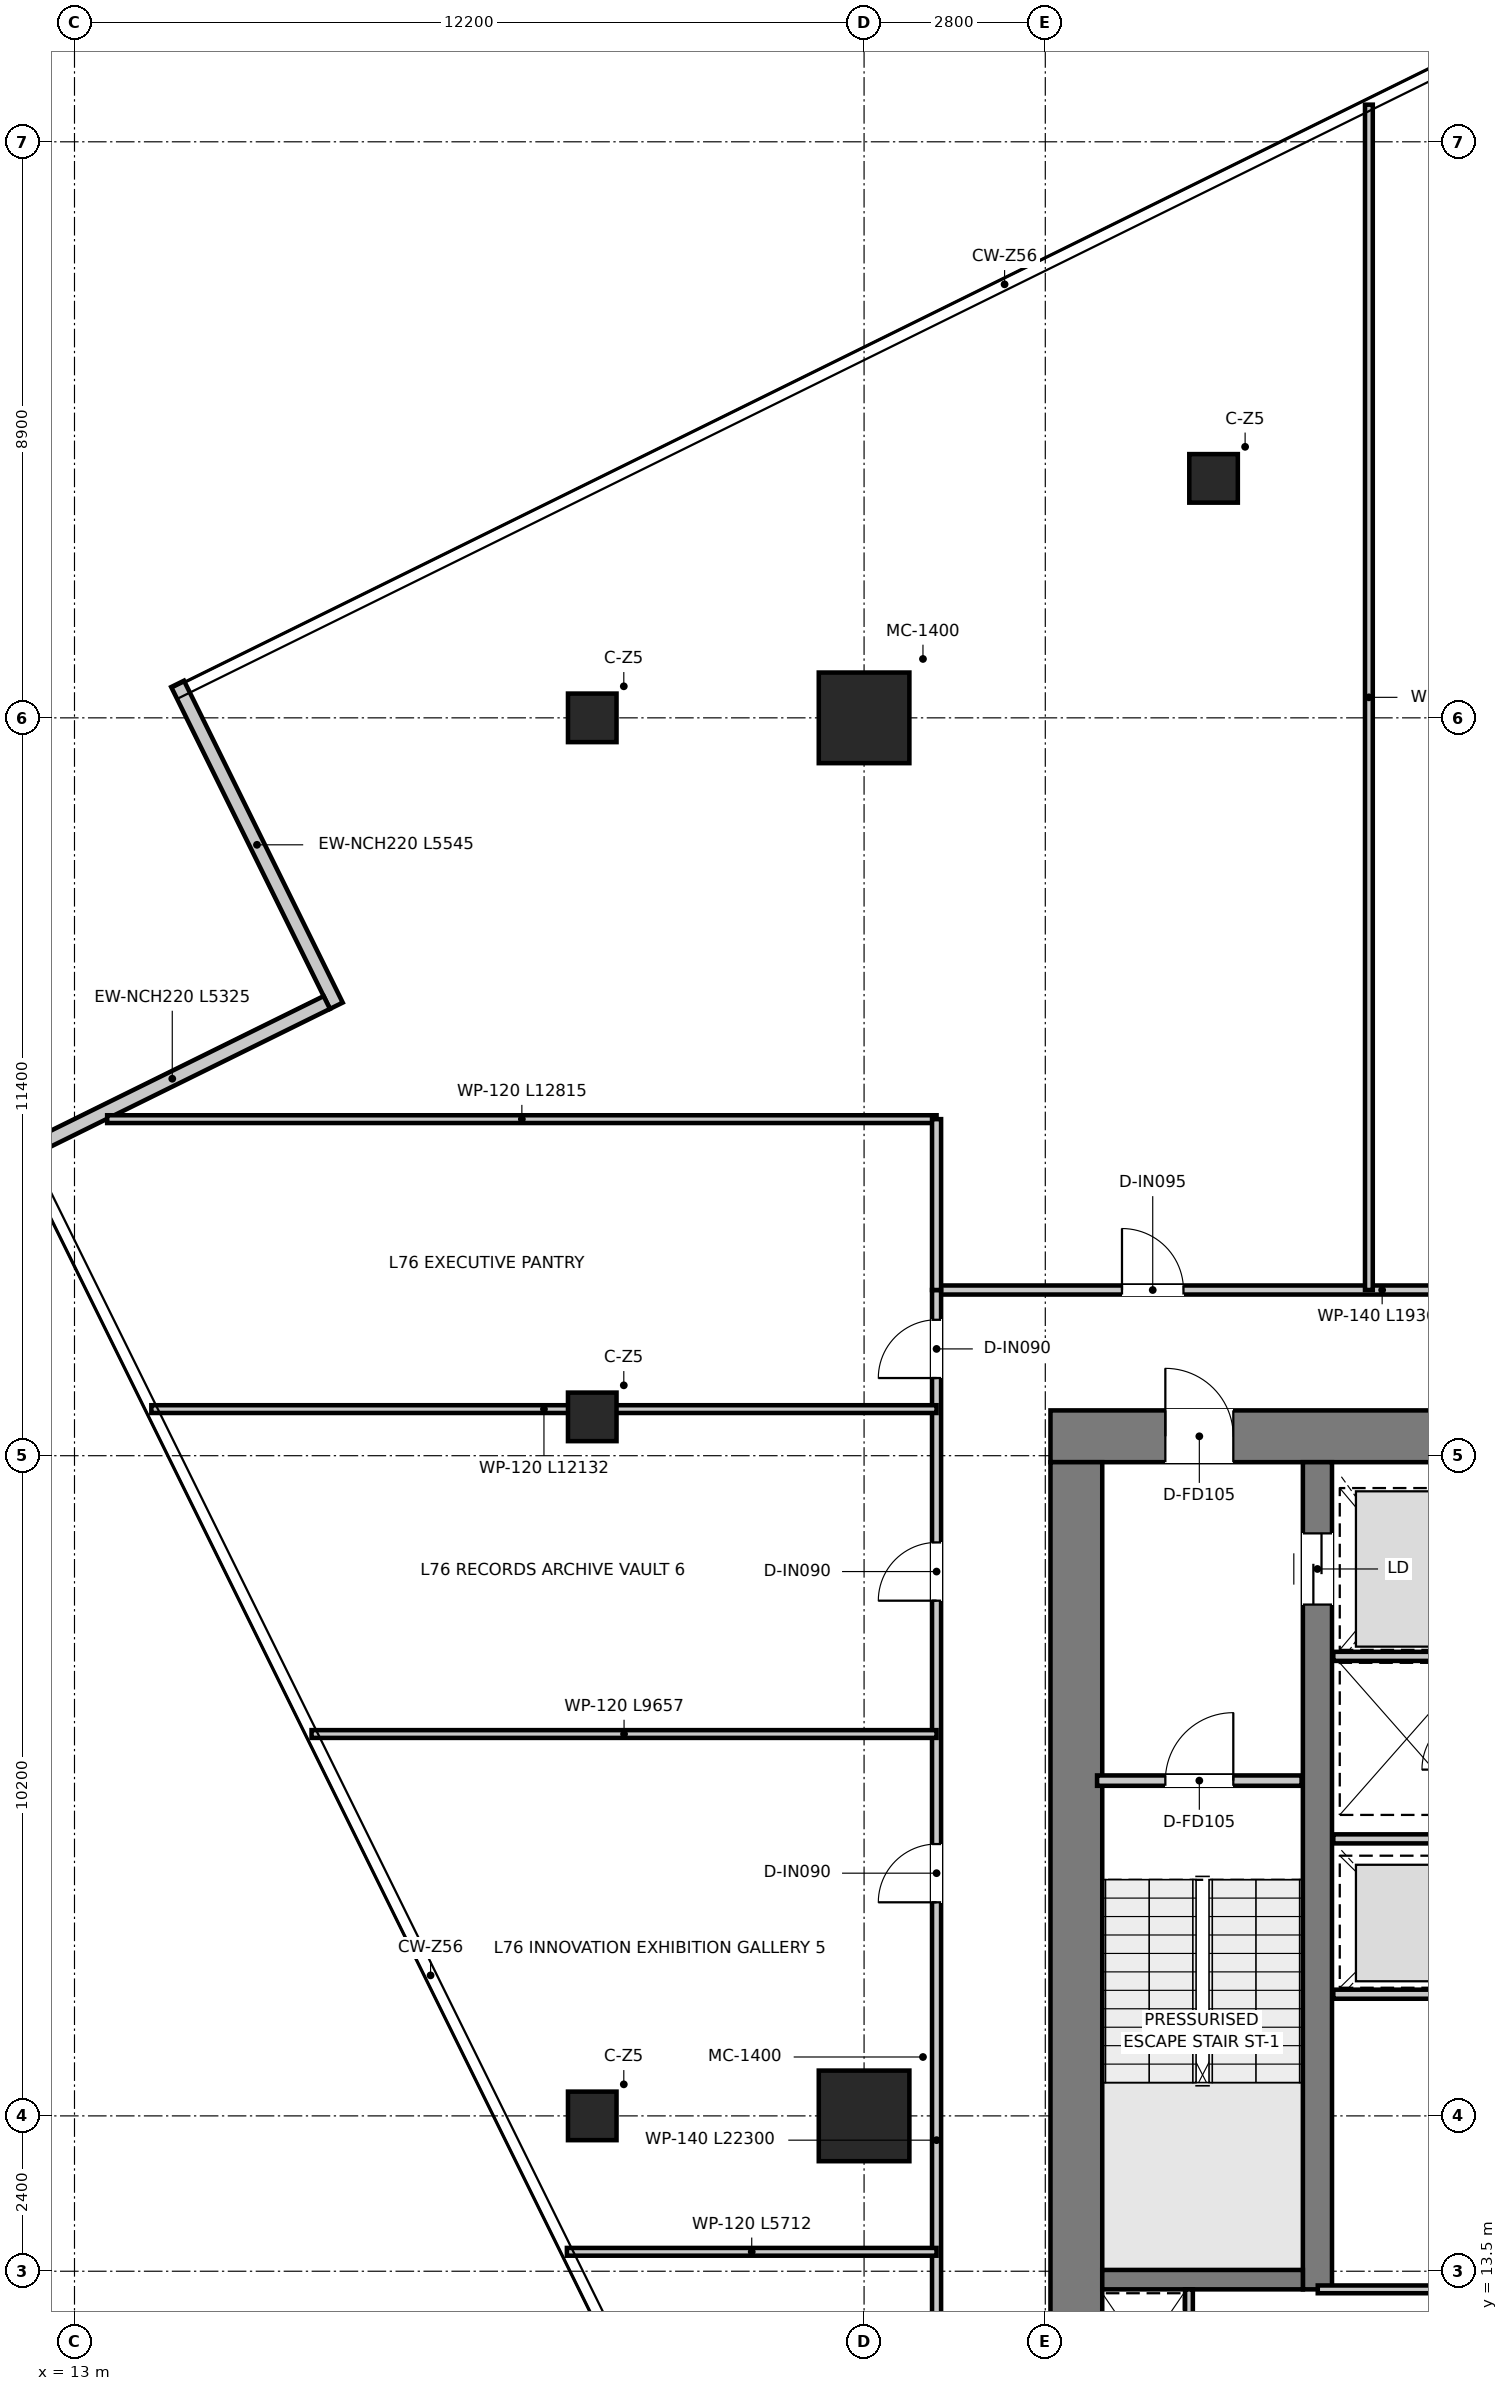
"""IFC4 building model, lengths in metres.
Left out: names, types, materials, properties, quantities, classifications, styles, units other than length and angle.
Written with IfcOpenShell. Run it as: python <this file> out.ifc"""

import sys

from ifc_helpers import new_model, si_unit, direction, frame, frame_2d, origin, origin_2d, place, context, subcontext, project, spatial, rectangle, extrude, source, transform, mapped, element, fill, save


model = new_model("IFC4")
c1 = context("Model", 3, precision=1e-05, world=origin(), true_north=direction((0.0, 1.0)))
c2 = subcontext(c1, "Body", "Model", "MODEL_VIEW")
j1 = project(units=[si_unit("LENGTHUNIT", "METRE"), si_unit("PLANEANGLEUNIT", "RADIAN")], contexts=[c1])
p1 = place(None, origin())
s1 = spatial("IfcSite", under=j1, at=p1, CompositionType="ELEMENT")
p2 = place(p1, origin())
s2 = spatial("IfcBuilding", under=s1, at=p2, CompositionType="ELEMENT")
p3 = place(p2, frame((0.0, 0.0, 310.85)))
s3 = spatial("IfcBuildingStorey", under=s2, at=p3, CompositionType="ELEMENT", Elevation=310.85)
p4 = place(p3, frame((28.08, 26.4, 0.0), z_axis=(0.0, 0.0, 1.0), x_axis=(1.0, 0.0, 0.0)))
e1 = element("IfcWall", 1, at=p4, inside=s3, PredefinedType="SHEAR", context=c2, shape_type="SweptSolid", body=[
    extrude(rectangle(XDim=15.84, YDim=0.8, at=frame_2d((7.92, 0.0))), origin(), (0.0, 0.0, 1.0), 3.95),
])
p5 = place(p4, frame((7.22, 0.0, 0.0)))
e2 = element("IfcOpeningElement", 2, at=p5, cuts=e1, PredefinedType="OPENING", context=c2, shape_type="SweptSolid", body=[
    extrude(rectangle(XDim=1.4, YDim=2.2, at=frame_2d((0.7, 1.1))), frame((0.0, 0.41, 0.0), z_axis=(0.0, -1.0, 0.0), x_axis=(1.0, 0.0, 0.0)), (0.0, 0.0, 1.0), 0.82),
])
p6 = place(p4, frame((1.775, 0.0, 0.0)))
e3 = element("IfcOpeningElement", 3, at=p6, cuts=e1, PredefinedType="OPENING", context=c2, shape_type="SweptSolid", body=[
    extrude(rectangle(XDim=1.05, YDim=2.1, at=frame_2d((0.525, 1.05))), frame((0.0, 0.41, 0.0), z_axis=(0.0, -1.0, 0.0), x_axis=(1.0, 0.0, 0.0)), (0.0, 0.0, 1.0), 0.82),
])
p7 = place(p4, frame((13.015, 0.0, 0.0)))
e4 = element("IfcOpeningElement", 4, at=p7, cuts=e1, PredefinedType="OPENING", context=c2, shape_type="SweptSolid", body=[
    extrude(rectangle(XDim=1.05, YDim=2.1, at=frame_2d((0.525, 1.05))), frame((0.0, 0.41, 0.0), z_axis=(0.0, -1.0, 0.0), x_axis=(1.0, 0.0, 0.0)), (0.0, 0.0, 1.0), 0.82),
])
p8 = place(p3, frame((28.48, 11.3, 0.0), z_axis=(0.0, 0.0, 1.0), x_axis=(0.0, 1.0, 0.0)))
e5 = element("IfcWall", 5, at=p8, inside=s3, PredefinedType="SHEAR", context=c2, shape_type="SweptSolid", body=[
    extrude(rectangle(XDim=14.7, YDim=0.8, at=frame_2d((7.35, 0.0))), origin(), (0.0, 0.0, 1.0), 3.95),
])
p9 = place(p3, frame((32.205, 13.22, 0.0), z_axis=(0.0, 0.0, 1.0), x_axis=(0.0, 1.0, 0.0)))
e6 = element("IfcWall", 6, at=p9, inside=s3, PredefinedType="SHEAR", context=c2, shape_type="SweptSolid", body=[
    extrude(rectangle(XDim=12.78, YDim=0.45, at=frame_2d((6.39, 0.0))), origin(), (0.0, 0.0, 1.0), 3.95),
])
p10 = place(p9, frame((10.58, 0.0, 0.0)))
e7 = element("IfcOpeningElement", 7, at=p10, cuts=e6, PredefinedType="OPENING", context=c2, shape_type="SweptSolid", body=[
    extrude(rectangle(XDim=1.1, YDim=2.15, at=frame_2d((0.55, 1.075))), frame((0.0, 0.235, 0.0), z_axis=(0.0, -1.0, 0.0), x_axis=(1.0, 0.0, 0.0)), (0.0, 0.0, 1.0), 0.47),
])
p11 = place(p3, frame((28.88, 13.37, 0.0), z_axis=(0.0, 0.0, 1.0), x_axis=(1.0, 0.0, 0.0)))
e8 = element("IfcWall", 8, at=p11, inside=s3, PredefinedType="SHEAR", context=c2, shape_type="SweptSolid", body=[
    extrude(rectangle(XDim=3.1, YDim=0.3, at=frame_2d((1.55, 0.0))), origin(), (0.0, 0.0, 1.0), 3.95),
])
m1 = source(origin(), c2, "Body", "SweptSolid", [
    extrude(rectangle(XDim=1.4, YDim=1.4, at=origin_2d()), origin(), (0.0, 0.0, 1.0), 3.95),
])
for number, where, z_axis, x_axis in (
    (9, (25.2, 15.9, 0.0), (0.0, 0.0, 1.0), (1.0, 0.0, 0.0)),
    (10, (25.2, 37.5, 0.0), (0.0, 0.0, 1.0), (1.0, 0.0, 0.0)),
):
    element("IfcColumn", number, at=place(p3, frame(where, z_axis=z_axis, x_axis=x_axis)), inside=s3, PredefinedType="USERDEFINED", context=c2, shape_type="MappedRepresentation", body=[
        mapped(m1, transform((0.0, 0.0, 0.0), x_axis=(1.0, 0.0, 0.0), y_axis=(0.0, 1.0, 0.0), z_axis=(0.0, 0.0, 1.0), scale=1.0)),
    ])
m2 = source(origin(), c2, "Body", "SweptSolid", [
    extrude(rectangle(XDim=0.75, YDim=0.75, at=origin_2d()), origin(), (0.0, 0.0, 1.0), 3.95),
])
for number, where, z_axis, x_axis in (
    (11, (21.0, 15.9, 0.0), (0.0, 0.0, 1.0), (1.0, 0.0, 0.0)),
    (12, (21.0, 26.7, 0.0), (0.0, 0.0, 1.0), (1.0, 0.0, 0.0)),
    (13, (21.0, 37.5, 0.0), (0.0, 0.0, 1.0), (1.0, 0.0, 0.0)),
    (14, (30.6, 41.2, 0.0), (0.0, 0.0, 1.0), (1.0, 0.0, 0.0)),
):
    element("IfcColumn", number, at=place(p3, frame(where, z_axis=z_axis, x_axis=x_axis)), inside=s3, PredefinedType="COLUMN", context=c2, shape_type="MappedRepresentation", body=[
        mapped(m2, transform((0.0, 0.0, 0.0), x_axis=(1.0, 0.0, 0.0), y_axis=(0.0, 1.0, 0.0), z_axis=(0.0, 0.0, 1.0), scale=1.0)),
    ])
p12 = place(p3, frame((14.594, 38.025, 0.0), z_axis=(0.0, 0.0, 1.0), x_axis=(0.442275503639, -0.896879244314, 0.0)))
e15 = element("IfcWall", 15, at=p12, inside=s3, PredefinedType="ELEMENTEDWALL", context=c2, shape_type="SweptSolid", body=[
    extrude(rectangle(XDim=5.545, YDim=0.22, at=frame_2d((2.772, 0.0))), origin(), (0.0, 0.0, 1.0), 3.67),
])
p13 = place(p3, frame((16.899, 33.102, 0.0), z_axis=(0.0, 0.0, 1.0), x_axis=(-0.896889306105, -0.442255099003, 0.0)))
e16 = element("IfcWall", 16, at=p13, inside=s3, PredefinedType="ELEMENTEDWALL", context=c2, shape_type="SweptSolid", body=[
    extrude(rectangle(XDim=5.325, YDim=0.22, at=frame_2d((2.663, 0.0))), origin(), (0.0, 0.0, 1.0), 3.67),
])
p14 = place(p3, frame((28.8, 21.08, 0.0), z_axis=(0.0, 0.0, 1.0), x_axis=(1.0, 0.0, 0.0)))
e17 = element("IfcWall", 17, at=p14, inside=s3, PredefinedType="PARTITIONING", context=c2, shape_type="SweptSolid", body=[
    extrude(rectangle(XDim=3.16, YDim=0.16, at=frame_2d((1.58, 0.0))), origin(), (0.0, 0.0, 1.0), 3.67),
])
p15 = place(p14, frame((1.055, 0.0, 0.0)))
e18 = element("IfcOpeningElement", 18, at=p15, cuts=e17, PredefinedType="OPENING", context=c2, shape_type="SweptSolid", body=[
    extrude(rectangle(XDim=1.05, YDim=2.1, at=frame_2d((0.525, 1.05))), frame((0.0, 0.09, 0.0), z_axis=(0.0, -1.0, 0.0), x_axis=(1.0, 0.0, 0.0)), (0.0, 0.0, 1.0), 0.18),
])
p16 = place(p3, frame((32.45, 23.0, 0.0), z_axis=(0.0, 0.0, 1.0), x_axis=(1.0, 0.0, 0.0)))
e19 = element("IfcWall", 19, at=p16, inside=s3, PredefinedType="PARTITIONING", context=c2, shape_type="SweptSolid", body=[
    extrude(rectangle(XDim=2.27, YDim=0.14, at=frame_2d((1.135, 0.0))), origin(), (0.0, 0.0, 1.0), 2.82),
])
for number, where, z_axis, x_axis in (
    (20, (32.45, 17.78, 0.0), (0.0, 0.0, 1.0), (1.0, 0.0, 0.0)),
    (21, (32.45, 20.18, 0.0), (0.0, 0.0, 1.0), (1.0, 0.0, 0.0)),
):
    element("IfcWall", number, at=place(p3, frame(where, z_axis=z_axis, x_axis=x_axis)), inside=s3, PredefinedType="PARTITIONING", context=c2, shape_type="SweptSolid", body=[
        extrude(rectangle(XDim=2.27, YDim=0.14, at=frame_2d((1.135, 0.0))), origin(), (0.0, 0.0, 1.0), 3.67),
    ])
p17 = place(p3, frame((30.22, 11.25, 0.0), z_axis=(0.0, 0.0, 1.0), x_axis=(0.0, 1.0, 0.0)))
e22 = element("IfcWall", 22, at=p17, inside=s3, PredefinedType="PARTITIONING", context=c2, shape_type="SweptSolid", body=[
    extrude(rectangle(XDim=1.97, YDim=0.12, at=frame_2d((0.985, 0.0))), origin(), (0.0, 0.0, 1.0), 3.67),
])
p18 = place(p3, frame((32.21, 13.22, 0.0), z_axis=(0.0, 0.0, 1.0), x_axis=(1.0, 0.0, 0.0)))
e23 = element("IfcWall", 23, at=p18, inside=s3, PredefinedType="PARTITIONING", context=c2, shape_type="SweptSolid", body=[
    extrude(rectangle(XDim=7.58, YDim=0.12, at=frame_2d((3.79, 0.0))), origin(), (0.0, 0.0, 1.0), 3.67),
])
p19 = place(p18, frame((3.365, 0.0, 0.0)))
e24 = element("IfcOpeningElement", 24, at=p19, cuts=e23, PredefinedType="OPENING", context=c2, shape_type="SweptSolid", body=[
    extrude(rectangle(XDim=0.85, YDim=2.1, at=frame_2d((0.425, 1.05))), frame((0.0, 0.07, 0.0), z_axis=(0.0, -1.0, 0.0), x_axis=(1.0, 0.0, 0.0)), (0.0, 0.0, 1.0), 0.14),
])
p20 = place(p3, frame((26.32, 28.66, 0.0), z_axis=(0.0, 0.0, 1.0), x_axis=(1.0, 0.0, 0.0)))
e25 = element("IfcWall", 25, at=p20, inside=s3, PredefinedType="PARTITIONING", context=c2, shape_type="SweptSolid", body=[
    extrude(rectangle(XDim=19.36, YDim=0.14, at=frame_2d((9.68, 0.0))), origin(), (0.0, 0.0, 1.0), 3.18),
])
p21 = place(p20, frame((2.865, 0.0, 0.0)))
e26 = element("IfcOpeningElement", 26, at=p21, cuts=e25, PredefinedType="OPENING", context=c2, shape_type="SweptSolid", body=[
    extrude(rectangle(XDim=0.95, YDim=2.1, at=frame_2d((0.475, 1.05))), frame((0.0, 0.08, 0.0), z_axis=(0.0, -1.0, 0.0), x_axis=(1.0, 0.0, 0.0)), (0.0, 0.0, 1.0), 0.16),
])
p22 = place(p20, frame((9.955, 0.0, 0.0)))
e27 = element("IfcOpeningElement", 27, at=p22, cuts=e25, PredefinedType="OPENING", context=c2, shape_type="SweptSolid", body=[
    extrude(rectangle(XDim=0.95, YDim=2.1, at=frame_2d((0.475, 1.05))), frame((0.0, 0.08, 0.0), z_axis=(0.0, -1.0, 0.0), x_axis=(1.0, 0.0, 0.0)), (0.0, 0.0, 1.0), 0.16),
])
p23 = place(p20, frame((16.295, 0.0, 0.0)))
e28 = element("IfcOpeningElement", 28, at=p23, cuts=e25, PredefinedType="OPENING", context=c2, shape_type="SweptSolid", body=[
    extrude(rectangle(XDim=0.95, YDim=2.1, at=frame_2d((0.475, 1.05))), frame((0.0, 0.08, 0.0), z_axis=(0.0, -1.0, 0.0), x_axis=(1.0, 0.0, 0.0)), (0.0, 0.0, 1.0), 0.16),
])
p24 = place(p3, frame((26.32, 9.0, 0.0), z_axis=(0.0, 0.0, 1.0), x_axis=(0.0, 1.0, 0.0)))
e29 = element("IfcWall", 29, at=p24, inside=s3, PredefinedType="PARTITIONING", context=c2, shape_type="SweptSolid", body=[
    extrude(rectangle(XDim=19.66, YDim=0.14, at=frame_2d((9.83, 0.0))), origin(), (0.0, 0.0, 1.0), 3.13),
])
p25 = place(p24, frame((18.3, 0.0, 0.0)))
e30 = element("IfcOpeningElement", 30, at=p25, cuts=e29, PredefinedType="OPENING", context=c2, shape_type="SweptSolid", body=[
    extrude(rectangle(XDim=0.9, YDim=2.1, at=frame_2d((0.45, 1.05))), frame((0.0, 0.08, 0.0), z_axis=(0.0, -1.0, 0.0), x_axis=(1.0, 0.0, 0.0)), (0.0, 0.0, 1.0), 0.16),
])
p26 = place(p24, frame((1.95, 0.0, 0.0)))
e31 = element("IfcOpeningElement", 31, at=p26, cuts=e29, PredefinedType="OPENING", context=c2, shape_type="SweptSolid", body=[
    extrude(rectangle(XDim=0.9, YDim=2.1, at=frame_2d((0.45, 1.05))), frame((0.0, 0.08, 0.0), z_axis=(0.0, -1.0, 0.0), x_axis=(1.0, 0.0, 0.0)), (0.0, 0.0, 1.0), 0.16),
])
p27 = place(p24, frame((10.2, 0.0, 0.0)))
e32 = element("IfcOpeningElement", 32, at=p27, cuts=e29, PredefinedType="OPENING", context=c2, shape_type="SweptSolid", body=[
    extrude(rectangle(XDim=0.9, YDim=2.1, at=frame_2d((0.45, 1.05))), frame((0.0, 0.08, 0.0), z_axis=(0.0, -1.0, 0.0), x_axis=(1.0, 0.0, 0.0)), (0.0, 0.0, 1.0), 0.16),
])
p28 = place(p24, frame((14.86, 0.0, 0.0)))
e33 = element("IfcOpeningElement", 33, at=p28, cuts=e29, PredefinedType="OPENING", context=c2, shape_type="SweptSolid", body=[
    extrude(rectangle(XDim=0.9, YDim=2.1, at=frame_2d((0.45, 1.05))), frame((0.0, 0.08, 0.0), z_axis=(0.0, -1.0, 0.0), x_axis=(1.0, 0.0, 0.0)), (0.0, 0.0, 1.0), 0.16),
])
p29 = place(p3, frame((14.188, 26.82, 0.0), z_axis=(0.0, 0.0, 1.0), x_axis=(1.0, 0.0, 0.0)))
e34 = element("IfcWall", 34, at=p29, inside=s3, PredefinedType="PARTITIONING", context=c2, shape_type="SweptSolid", body=[
    extrude(rectangle(XDim=12.133, YDim=0.12, at=frame_2d((6.066, 0.0))), origin(), (0.0, 0.0, 1.0), 3.13),
])
p30 = place(p3, frame((13.505, 31.3, 0.0), z_axis=(0.0, 0.0, 1.0), x_axis=(1.0, 0.0, 0.0)))
e35 = element("IfcWall", 35, at=p30, inside=s3, PredefinedType="PARTITIONING", context=c2, shape_type="SweptSolid", body=[
    extrude(rectangle(XDim=12.815, YDim=0.12, at=frame_2d((6.408, 0.0))), origin(), (0.0, 0.0, 1.0), 3.13),
])
p31 = place(p3, frame((26.32, 28.66, 0.0), z_axis=(0.0, 0.0, 1.0), x_axis=(0.0, 1.0, 0.0)))
e36 = element("IfcWall", 36, at=p31, inside=s3, PredefinedType="PARTITIONING", context=c2, shape_type="SweptSolid", body=[
    extrude(rectangle(XDim=2.64, YDim=0.14, at=frame_2d((1.32, 0.0))), origin(), (0.0, 0.0, 1.0), 3.43),
])
p32 = place(p3, frame((33.0, 28.66, 0.0), z_axis=(0.0, 0.0, 1.0), x_axis=(0.0, 1.0, 0.0)))
e37 = element("IfcWall", 37, at=p32, inside=s3, PredefinedType="PARTITIONING", context=c2, shape_type="SweptSolid", body=[
    extrude(rectangle(XDim=18.314, YDim=0.12, at=frame_2d((9.157, 0.0))), origin(), (0.0, 0.0, 1.0), 3.13),
])
p33 = place(p3, frame((20.608, 13.8, 0.0), z_axis=(0.0, 0.0, 1.0), x_axis=(1.0, 0.0, 0.0)))
e38 = element("IfcWall", 38, at=p33, inside=s3, PredefinedType="PARTITIONING", context=c2, shape_type="SweptSolid", body=[
    extrude(rectangle(XDim=5.712, YDim=0.12, at=frame_2d((2.856, 0.0))), origin(), (0.0, 0.0, 1.0), 3.18),
])
p34 = place(p3, frame((16.663, 21.8, 0.0), z_axis=(0.0, 0.0, 1.0), x_axis=(1.0, 0.0, 0.0)))
e39 = element("IfcWall", 39, at=p34, inside=s3, PredefinedType="PARTITIONING", context=c2, shape_type="SweptSolid", body=[
    extrude(rectangle(XDim=9.657, YDim=0.12, at=frame_2d((4.829, 0.0))), origin(), (0.0, 0.0, 1.0), 3.13),
])
p35 = place(p15, origin())
e40 = element("IfcDoor", 40, at=p35, inside=s3, OperationType="SINGLE_SWING_RIGHT", PredefinedType="DOOR", context=c2, shape_type="SweptSolid", body=[
    extrude(rectangle(XDim=1.05, YDim=2.1, at=frame_2d((0.525, 1.05))), frame((0.0, 0.025, 0.0), z_axis=(0.0, -1.0, 0.0), x_axis=(1.0, 0.0, 0.0)), (0.0, 0.0, 1.0), 0.05),
])
fill(e18, e40)
p36 = place(p6, origin())
e41 = element("IfcDoor", 41, at=p36, inside=s3, OperationType="SINGLE_SWING_LEFT", PredefinedType="DOOR", context=c2, shape_type="SweptSolid", body=[
    extrude(rectangle(XDim=1.05, YDim=2.1, at=frame_2d((0.525, 1.05))), frame((0.0, 0.025, 0.0), z_axis=(0.0, -1.0, 0.0), x_axis=(1.0, 0.0, 0.0)), (0.0, 0.0, 1.0), 0.05),
])
fill(e3, e41)
p37 = place(p10, origin())
e42 = element("IfcDoor", 42, at=p37, inside=s3, OperationType="DOUBLE_DOOR_SLIDING", PredefinedType="DOOR", context=c2, shape_type="SweptSolid", body=[
    extrude(rectangle(XDim=1.1, YDim=2.15, at=frame_2d((0.55, 1.075))), frame((0.0, 0.025, 0.0), z_axis=(0.0, -1.0, 0.0), x_axis=(1.0, 0.0, 0.0)), (0.0, 0.0, 1.0), 0.05),
])
fill(e7, e42)
p38 = place(p25, origin())
e43 = element("IfcDoor", 43, at=p38, inside=s3, OperationType="SINGLE_SWING_LEFT", PredefinedType="DOOR", context=c2, shape_type="SweptSolid", body=[
    extrude(rectangle(XDim=0.9, YDim=2.1, at=frame_2d((0.45, 1.05))), frame((0.0, 0.025, 0.0), z_axis=(0.0, -1.0, 0.0), x_axis=(1.0, 0.0, 0.0)), (0.0, 0.0, 1.0), 0.05),
])
fill(e30, e43)
p39 = place(p21, origin())
e44 = element("IfcDoor", 44, at=p39, inside=s3, OperationType="SINGLE_SWING_LEFT", PredefinedType="DOOR", context=c2, shape_type="SweptSolid", body=[
    extrude(rectangle(XDim=0.95, YDim=2.1, at=frame_2d((0.475, 1.05))), frame((0.0, 0.025, 0.0), z_axis=(0.0, -1.0, 0.0), x_axis=(1.0, 0.0, 0.0)), (0.0, 0.0, 1.0), 0.05),
])
fill(e26, e44)
p40 = place(p27, origin())
e45 = element("IfcDoor", 45, at=p40, inside=s3, OperationType="SINGLE_SWING_LEFT", PredefinedType="DOOR", context=c2, shape_type="SweptSolid", body=[
    extrude(rectangle(XDim=0.9, YDim=2.1, at=frame_2d((0.45, 1.05))), frame((0.0, 0.025, 0.0), z_axis=(0.0, -1.0, 0.0), x_axis=(1.0, 0.0, 0.0)), (0.0, 0.0, 1.0), 0.05),
])
fill(e32, e45)
p41 = place(p28, origin())
e46 = element("IfcDoor", 46, at=p41, inside=s3, OperationType="SINGLE_SWING_LEFT", PredefinedType="DOOR", context=c2, shape_type="SweptSolid", body=[
    extrude(rectangle(XDim=0.9, YDim=2.1, at=frame_2d((0.45, 1.05))), frame((0.0, 0.025, 0.0), z_axis=(0.0, -1.0, 0.0), x_axis=(1.0, 0.0, 0.0)), (0.0, 0.0, 1.0), 0.05),
])
fill(e33, e46)
save(model, sys.argv[1])
